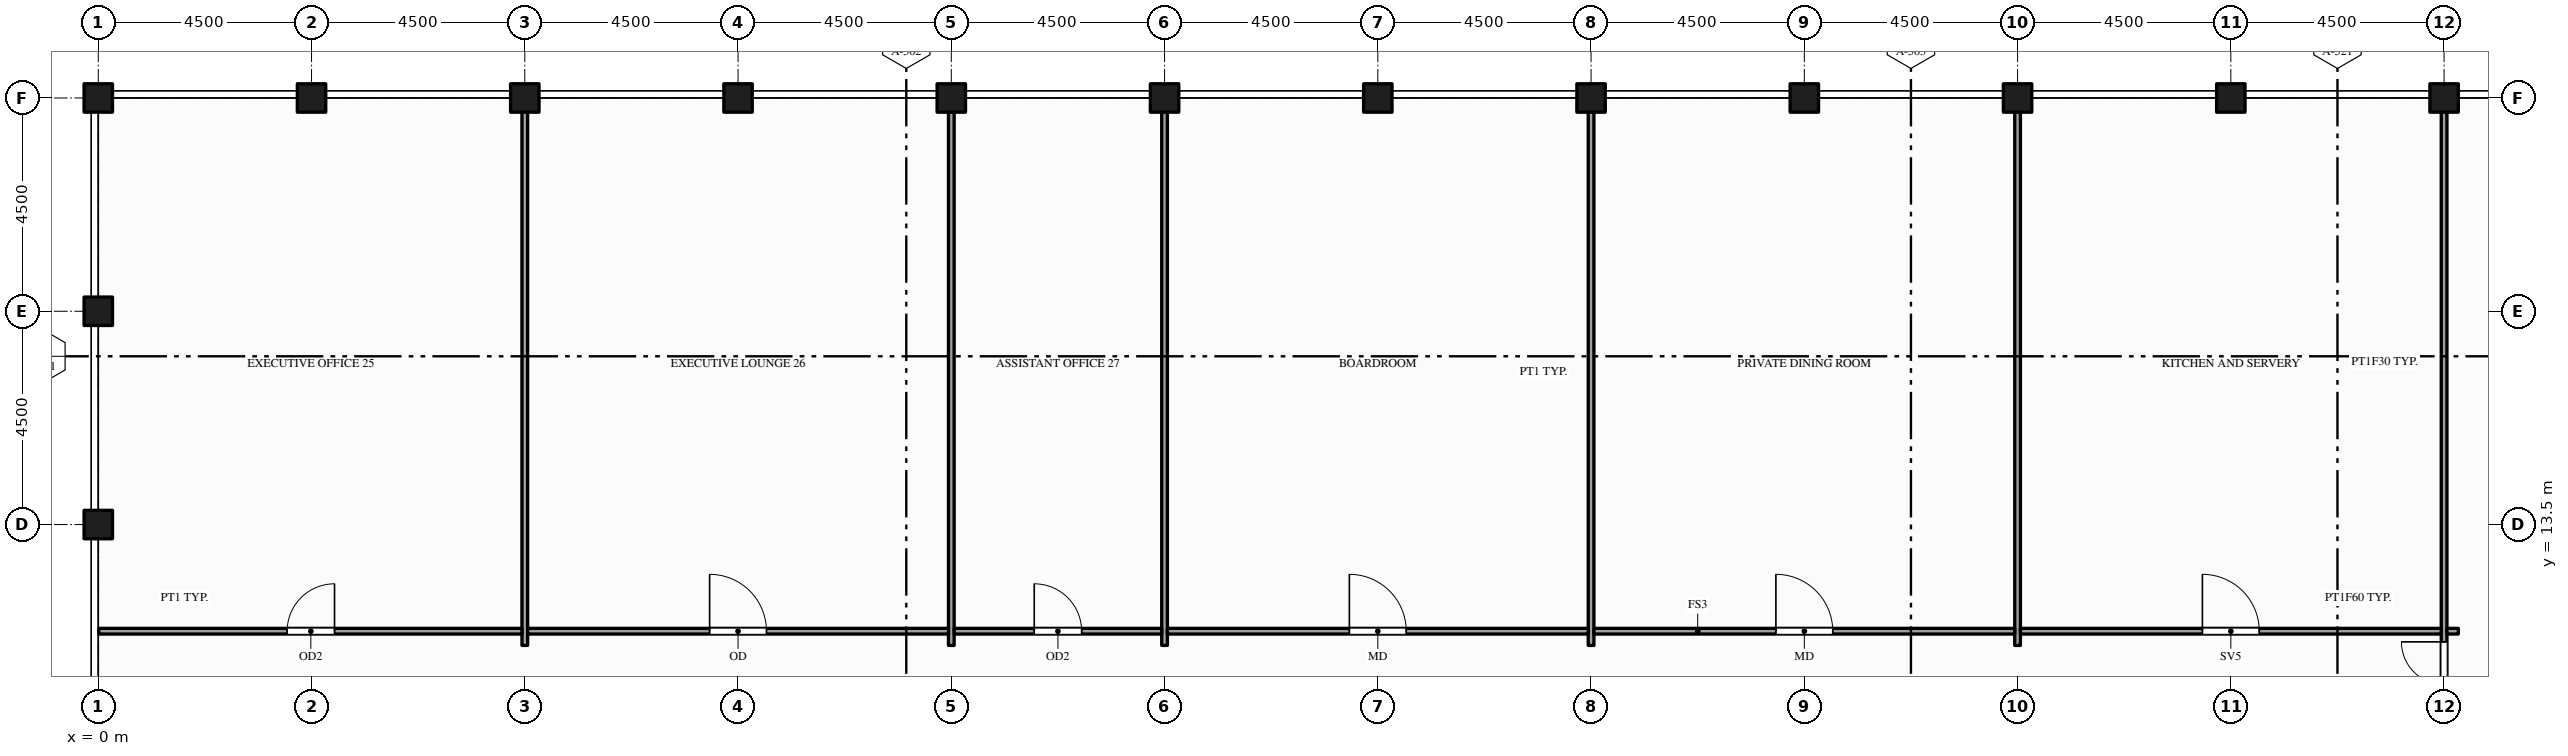
"""IFC4 building model, lengths in metres.
Left out: names, types, materials, properties, quantities, classifications, styles, units other than length and angle.
Written with IfcOpenShell. Run it as: python <this file> out.ifc"""

import sys

from ifc_helpers import new_model, si_unit, direction, frame, frame_2d, origin, origin_2d, place, context, subcontext, project, spatial, rectangle, hollow_rectangle, extrude, element, fill, save


model = new_model("IFC4")
c1 = context("Model", 3, precision=1e-05, world=origin(), true_north=direction((0.0, 1.0)))
c2 = subcontext(c1, "Body", "Model", "MODEL_VIEW")
j1 = project(units=[si_unit("LENGTHUNIT", "METRE"), si_unit("PLANEANGLEUNIT", "RADIAN")], contexts=[c1])
p1 = place(None, origin())
s1 = spatial("IfcSite", under=j1, at=p1, CompositionType="ELEMENT")
p2 = place(p1, origin())
s2 = spatial("IfcBuilding", under=s1, at=p2, CompositionType="ELEMENT")
p3 = place(p2, frame((0.0, 0.0, 332.0)))
s3 = spatial("IfcBuildingStorey", under=s2, at=p3, CompositionType="ELEMENT", Elevation=332.0)
for number, where, z_axis, x_axis in (
    (1, (0.0, 13.5, -0.15), (0.0, 0.0, 1.0), (1.0, 0.0, 0.0)),
    (2, (0.0, 18.0, -0.15), (0.0, 0.0, 1.0), (1.0, 0.0, 0.0)),
    (3, (0.0, 22.5, -0.15), (0.0, 0.0, 1.0), (1.0, 0.0, 0.0)),
    (4, (4.5, 22.5, -0.15), (0.0, 0.0, 1.0), (1.0, 0.0, 0.0)),
    (5, (9.0, 22.5, -0.15), (0.0, 0.0, 1.0), (1.0, 0.0, 0.0)),
    (6, (13.5, 22.5, -0.15), (0.0, 0.0, 1.0), (1.0, 0.0, 0.0)),
    (7, (18.0, 22.5, -0.15), (0.0, 0.0, 1.0), (1.0, 0.0, 0.0)),
    (8, (22.5, 22.5, -0.15), (0.0, 0.0, 1.0), (1.0, 0.0, 0.0)),
    (9, (27.0, 22.5, -0.15), (0.0, 0.0, 1.0), (1.0, 0.0, 0.0)),
    (10, (31.5, 22.5, -0.15), (0.0, 0.0, 1.0), (1.0, 0.0, 0.0)),
    (11, (36.0, 22.5, -0.15), (0.0, 0.0, 1.0), (1.0, 0.0, 0.0)),
    (12, (40.5, 22.5, -0.15), (0.0, 0.0, 1.0), (1.0, 0.0, 0.0)),
    (13, (45.0, 22.5, -0.15), (0.0, 0.0, 1.0), (1.0, 0.0, 0.0)),
    (14, (49.5, 22.5, -0.15), (0.0, 0.0, 1.0), (1.0, 0.0, 0.0)),
):
    element("IfcColumn", number, at=place(p3, frame(where, z_axis=z_axis, x_axis=x_axis)), inside=s3, PredefinedType="COLUMN", context=c2, shape_type="SweptSolid", body=[
        extrude(hollow_rectangle(XDim=0.6, YDim=0.6, WallThickness=0.03, at=origin_2d()), origin(), (0.0, 0.0, 1.0), 4.5),
    ])
for number, where, z_axis, x_axis in (
    (15, (9.0, 10.95, 0.0), (0.0, 0.0, 1.0), (0.0, 1.0, 0.0)),
    (16, (18.0, 10.95, 0.0), (0.0, 0.0, 1.0), (0.0, 1.0, 0.0)),
    (17, (22.5, 10.95, 0.0), (0.0, 0.0, 1.0), (0.0, 1.0, 0.0)),
    (18, (31.5, 10.95, 0.0), (0.0, 0.0, 1.0), (0.0, 1.0, 0.0)),
    (19, (40.5, 10.95, 0.0), (0.0, 0.0, 1.0), (0.0, 1.0, 0.0)),
):
    element("IfcWall", number, at=place(p3, frame(where, z_axis=z_axis, x_axis=x_axis)), inside=s3, PredefinedType="PARTITIONING", context=c2, shape_type="SweptSolid", body=[
        extrude(rectangle(XDim=11.54, YDim=0.12, at=frame_2d((5.77, 0.0))), origin(), (0.0, 0.0, 1.0), 3.359),
    ])
p4 = place(p3, frame((49.5, 0.01, 0.0), z_axis=(0.0, 0.0, 1.0), x_axis=(0.0, 1.0, 0.0)))
e20 = element("IfcWall", 20, at=p4, inside=s3, PredefinedType="PARTITIONING", context=c2, shape_type="SweptSolid", body=[
    extrude(rectangle(XDim=22.48, YDim=0.12, at=frame_2d((11.24, 0.0))), origin(), (0.0, 0.0, 1.0), 3.359),
])
p5 = place(p4, frame((9.215, 0.0, 0.0)))
e21 = element("IfcOpeningElement", 21, at=p5, cuts=e20, PredefinedType="OPENING", context=c2, shape_type="SweptSolid", body=[
    extrude(rectangle(XDim=1.8, YDim=2.1, at=frame_2d((0.9, 1.05))), frame((0.0, 0.07, 0.0), z_axis=(0.0, -1.0, 0.0), x_axis=(1.0, 0.0, 0.0)), (0.0, 0.0, 1.0), 0.14),
])
p6 = place(p4, frame((0.99, 0.0, 0.0)))
e22 = element("IfcOpeningElement", 22, at=p6, cuts=e20, PredefinedType="OPENING", context=c2, shape_type="SweptSolid", body=[
    extrude(rectangle(XDim=0.9, YDim=2.1, at=frame_2d((0.45, 1.05))), frame((0.0, 0.07, 0.0), z_axis=(0.0, -1.0, 0.0), x_axis=(1.0, 0.0, 0.0)), (0.0, 0.0, 1.0), 0.14),
])
p7 = place(p4, frame((4.04, 0.0, 0.0)))
e23 = element("IfcOpeningElement", 23, at=p7, cuts=e20, PredefinedType="OPENING", context=c2, shape_type="SweptSolid", body=[
    extrude(rectangle(XDim=0.9, YDim=2.1, at=frame_2d((0.45, 1.05))), frame((0.0, 0.07, 0.0), z_axis=(0.0, -1.0, 0.0), x_axis=(1.0, 0.0, 0.0)), (0.0, 0.0, 1.0), 0.14),
])
p8 = place(p4, frame((6.99, 0.0, 0.0)))
e24 = element("IfcOpeningElement", 24, at=p8, cuts=e20, PredefinedType="OPENING", context=c2, shape_type="SweptSolid", body=[
    extrude(rectangle(XDim=1.0, YDim=2.1, at=frame_2d((0.5, 1.05))), frame((0.0, 0.07, 0.0), z_axis=(0.0, -1.0, 0.0), x_axis=(1.0, 0.0, 0.0)), (0.0, 0.0, 1.0), 0.14),
])
p9 = place(p3, frame((0.01, 11.25, 0.0), z_axis=(0.0, 0.0, 1.0), x_axis=(1.0, 0.0, 0.0)))
e25 = element("IfcWall", 25, at=p9, inside=s3, PredefinedType="PARTITIONING", context=c2, shape_type="SweptSolid", body=[
    extrude(rectangle(XDim=8.93, YDim=0.12, at=frame_2d((4.465, 0.0))), origin(), (0.0, 0.0, 1.0), 3.359),
])
p10 = place(p9, frame((3.975, 0.0, 0.0)))
e26 = element("IfcOpeningElement", 26, at=p10, cuts=e25, PredefinedType="OPENING", context=c2, shape_type="SweptSolid", body=[
    extrude(rectangle(XDim=1.0, YDim=2.1, at=frame_2d((0.5, 1.05))), frame((0.0, 0.07, 0.0), z_axis=(0.0, -1.0, 0.0), x_axis=(1.0, 0.0, 0.0)), (0.0, 0.0, 1.0), 0.14),
])
p11 = place(p3, frame((9.06, 11.25, 0.0), z_axis=(0.0, 0.0, 1.0), x_axis=(1.0, 0.0, 0.0)))
e27 = element("IfcWall", 27, at=p11, inside=s3, PredefinedType="PARTITIONING", context=c2, shape_type="SweptSolid", body=[
    extrude(rectangle(XDim=8.88, YDim=0.12, at=frame_2d((4.44, 0.0))), origin(), (0.0, 0.0, 1.0), 3.359),
])
p12 = place(p11, frame((3.84, 0.0, 0.0)))
e28 = element("IfcOpeningElement", 28, at=p12, cuts=e27, PredefinedType="OPENING", context=c2, shape_type="SweptSolid", body=[
    extrude(rectangle(XDim=1.2, YDim=2.1, at=frame_2d((0.6, 1.05))), frame((0.0, 0.07, 0.0), z_axis=(0.0, -1.0, 0.0), x_axis=(1.0, 0.0, 0.0)), (0.0, 0.0, 1.0), 0.14),
])
p13 = place(p3, frame((18.06, 11.25, 0.0), z_axis=(0.0, 0.0, 1.0), x_axis=(1.0, 0.0, 0.0)))
e29 = element("IfcWall", 29, at=p13, inside=s3, PredefinedType="PARTITIONING", context=c2, shape_type="SweptSolid", body=[
    extrude(rectangle(XDim=4.38, YDim=0.12, at=frame_2d((2.19, 0.0))), origin(), (0.0, 0.0, 1.0), 3.359),
])
p14 = place(p13, frame((1.69, 0.0, 0.0)))
e30 = element("IfcOpeningElement", 30, at=p14, cuts=e29, PredefinedType="OPENING", context=c2, shape_type="SweptSolid", body=[
    extrude(rectangle(XDim=1.0, YDim=2.1, at=frame_2d((0.5, 1.05))), frame((0.0, 0.07, 0.0), z_axis=(0.0, -1.0, 0.0), x_axis=(1.0, 0.0, 0.0)), (0.0, 0.0, 1.0), 0.14),
])
p15 = place(p3, frame((22.56, 11.25, 0.0), z_axis=(0.0, 0.0, 1.0), x_axis=(1.0, 0.0, 0.0)))
e31 = element("IfcWall", 31, at=p15, inside=s3, PredefinedType="PARTITIONING", context=c2, shape_type="SweptSolid", body=[
    extrude(rectangle(XDim=8.88, YDim=0.12, at=frame_2d((4.44, 0.0))), origin(), (0.0, 0.0, 1.0), 3.359),
])
p16 = place(p15, frame((3.84, 0.0, 0.0)))
e32 = element("IfcOpeningElement", 32, at=p16, cuts=e31, PredefinedType="OPENING", context=c2, shape_type="SweptSolid", body=[
    extrude(rectangle(XDim=1.2, YDim=2.1, at=frame_2d((0.6, 1.05))), frame((0.0, 0.07, 0.0), z_axis=(0.0, -1.0, 0.0), x_axis=(1.0, 0.0, 0.0)), (0.0, 0.0, 1.0), 0.14),
])
p17 = place(p3, frame((31.56, 11.25, 0.0), z_axis=(0.0, 0.0, 1.0), x_axis=(1.0, 0.0, 0.0)))
e33 = element("IfcWall", 33, at=p17, inside=s3, PredefinedType="PARTITIONING", context=c2, shape_type="SweptSolid", body=[
    extrude(rectangle(XDim=8.88, YDim=0.12, at=frame_2d((4.44, 0.0))), origin(), (0.0, 0.0, 1.0), 3.359),
])
p18 = place(p17, frame((3.84, 0.0, 0.0)))
e34 = element("IfcOpeningElement", 34, at=p18, cuts=e33, PredefinedType="OPENING", context=c2, shape_type="SweptSolid", body=[
    extrude(rectangle(XDim=1.2, YDim=2.1, at=frame_2d((0.6, 1.05))), frame((0.0, 0.07, 0.0), z_axis=(0.0, -1.0, 0.0), x_axis=(1.0, 0.0, 0.0)), (0.0, 0.0, 1.0), 0.14),
])
p19 = place(p3, frame((40.56, 11.25, 0.0), z_axis=(0.0, 0.0, 1.0), x_axis=(1.0, 0.0, 0.0)))
e35 = element("IfcWall", 35, at=p19, inside=s3, PredefinedType="PARTITIONING", context=c2, shape_type="SweptSolid", body=[
    extrude(rectangle(XDim=8.88, YDim=0.12, at=frame_2d((4.44, 0.0))), origin(), (0.0, 0.0, 1.0), 3.359),
])
p20 = place(p19, frame((3.84, 0.0, 0.0)))
e36 = element("IfcOpeningElement", 36, at=p20, cuts=e35, PredefinedType="OPENING", context=c2, shape_type="SweptSolid", body=[
    extrude(rectangle(XDim=1.2, YDim=2.1, at=frame_2d((0.6, 1.05))), frame((0.0, 0.07, 0.0), z_axis=(0.0, -1.0, 0.0), x_axis=(1.0, 0.0, 0.0)), (0.0, 0.0, 1.0), 0.14),
])
p21 = place(p3, frame((49.56, 11.25, 0.0), z_axis=(0.0, 0.0, 1.0), x_axis=(1.0, 0.0, 0.0)))
e37 = element("IfcWall", 37, at=p21, inside=s3, PredefinedType="PARTITIONING", context=c2, shape_type="SweptSolid", body=[
    extrude(rectangle(XDim=0.24, YDim=0.12, at=frame_2d((0.12, 0.0))), origin(), (0.0, 0.0, 1.0), 3.359),
])
p22 = place(p5, origin())
e38 = element("IfcDoor", 38, at=p22, inside=s3, OperationType="DOUBLE_DOOR_SINGLE_SWING", PredefinedType="DOOR", context=c2, shape_type="SweptSolid", body=[
    extrude(rectangle(XDim=1.8, YDim=2.1, at=frame_2d((0.9, 1.05))), frame((0.0, 0.025, 0.0), z_axis=(0.0, -1.0, 0.0), x_axis=(1.0, 0.0, 0.0)), (0.0, 0.0, 1.0), 0.05),
])
fill(e21, e38)
p23 = place(p10, origin())
e39 = element("IfcDoor", 39, at=p23, inside=s3, OperationType="SINGLE_SWING_RIGHT", PredefinedType="DOOR", context=c2, shape_type="SweptSolid", body=[
    extrude(rectangle(XDim=1.0, YDim=2.1, at=frame_2d((0.5, 1.05))), frame((0.0, 0.025, 0.0), z_axis=(0.0, -1.0, 0.0), x_axis=(1.0, 0.0, 0.0)), (0.0, 0.0, 1.0), 0.05),
])
fill(e26, e39)
p24 = place(p12, origin())
e40 = element("IfcDoor", 40, at=p24, inside=s3, OperationType="SINGLE_SWING_LEFT", PredefinedType="DOOR", context=c2, shape_type="SweptSolid", body=[
    extrude(rectangle(XDim=1.2, YDim=2.1, at=frame_2d((0.6, 1.05))), frame((0.0, 0.025, 0.0), z_axis=(0.0, -1.0, 0.0), x_axis=(1.0, 0.0, 0.0)), (0.0, 0.0, 1.0), 0.05),
])
fill(e28, e40)
p25 = place(p14, origin())
e41 = element("IfcDoor", 41, at=p25, inside=s3, OperationType="SINGLE_SWING_LEFT", PredefinedType="DOOR", context=c2, shape_type="SweptSolid", body=[
    extrude(rectangle(XDim=1.0, YDim=2.1, at=frame_2d((0.5, 1.05))), frame((0.0, 0.025, 0.0), z_axis=(0.0, -1.0, 0.0), x_axis=(1.0, 0.0, 0.0)), (0.0, 0.0, 1.0), 0.05),
])
fill(e30, e41)
p26 = place(p16, origin())
e42 = element("IfcDoor", 42, at=p26, inside=s3, OperationType="SINGLE_SWING_LEFT", PredefinedType="DOOR", context=c2, shape_type="SweptSolid", body=[
    extrude(rectangle(XDim=1.2, YDim=2.1, at=frame_2d((0.6, 1.05))), frame((0.0, 0.025, 0.0), z_axis=(0.0, -1.0, 0.0), x_axis=(1.0, 0.0, 0.0)), (0.0, 0.0, 1.0), 0.05),
])
fill(e32, e42)
p27 = place(p18, origin())
e43 = element("IfcDoor", 43, at=p27, inside=s3, OperationType="SINGLE_SWING_LEFT", PredefinedType="DOOR", context=c2, shape_type="SweptSolid", body=[
    extrude(rectangle(XDim=1.2, YDim=2.1, at=frame_2d((0.6, 1.05))), frame((0.0, 0.025, 0.0), z_axis=(0.0, -1.0, 0.0), x_axis=(1.0, 0.0, 0.0)), (0.0, 0.0, 1.0), 0.05),
])
fill(e34, e43)
p28 = place(p20, origin())
e44 = element("IfcDoor", 44, at=p28, inside=s3, OperationType="SINGLE_SWING_LEFT", PredefinedType="DOOR", context=c2, shape_type="SweptSolid", body=[
    extrude(rectangle(XDim=1.2, YDim=2.1, at=frame_2d((0.6, 1.05))), frame((0.0, 0.025, 0.0), z_axis=(0.0, -1.0, 0.0), x_axis=(1.0, 0.0, 0.0)), (0.0, 0.0, 1.0), 0.05),
])
fill(e36, e44)
save(model, sys.argv[1])
